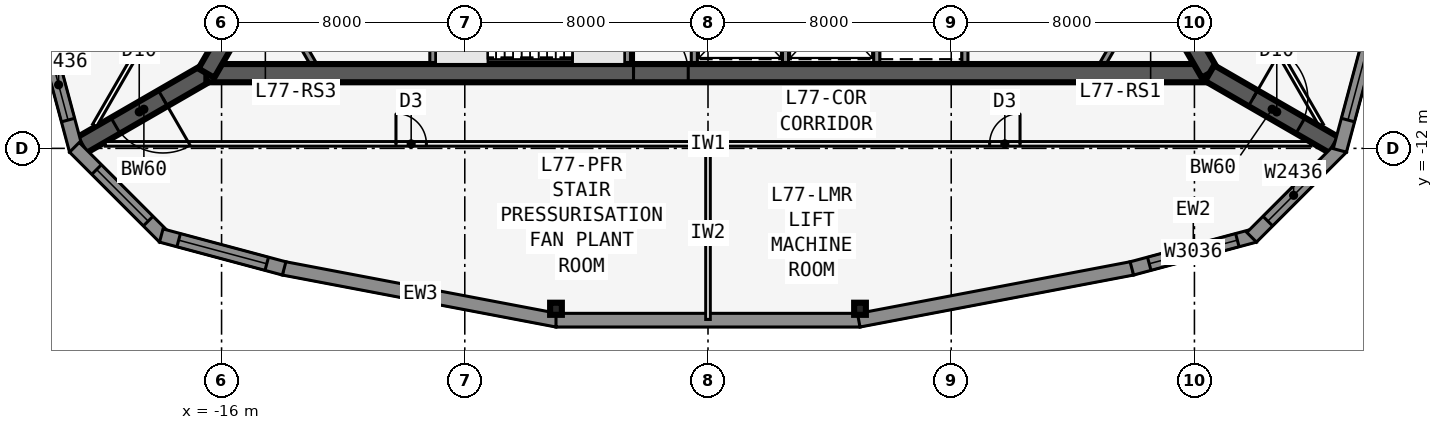
"""IFC4 building model, lengths in metres.
Left out: names, types, materials, properties, quantities, classifications, styles, units other than length and angle.
Written with IfcOpenShell. Run it as: python <this file> out.ifc"""

import sys

from ifc_helpers import new_model, si_unit, direction, frame, frame_2d, origin, origin_2d, place, context, subcontext, project, spatial, polyline, rectangle, i_section, outline, extrude, element, fill, save


model = new_model("IFC4")
c1 = context("Model", 3, precision=1e-05, world=origin(), true_north=direction((0.0, 1.0)))
c2 = subcontext(c1, "Body", "Model", "MODEL_VIEW")
j1 = project(units=[si_unit("LENGTHUNIT", "METRE"), si_unit("PLANEANGLEUNIT", "RADIAN")], contexts=[c1])
p1 = place(None, origin())
s1 = spatial("IfcSite", under=j1, at=p1, CompositionType="ELEMENT")
p2 = place(p1, origin())
s2 = spatial("IfcBuilding", under=s1, at=p2, CompositionType="ELEMENT")
p3 = place(p2, frame((0.0, 0.0, 297.8)))
s3 = spatial("IfcBuildingStorey", under=s2, at=p3, CompositionType="ELEMENT", Elevation=297.8)
p4 = place(p3, frame((-16.5, -9.526, 0.0), z_axis=(0.0, 0.0, 1.0), x_axis=(1.0, 0.0, 0.0)))
e1 = element("IfcWall", 1, at=p4, inside=s3, PredefinedType="SHEAR", context=c2, shape_type="SweptSolid", body=[
    extrude(rectangle(XDim=33.0, YDim=0.6, at=frame_2d((16.5, 0.0))), origin(), (0.0, 0.0, 1.0), 6.0),
])
p5 = place(p4, frame((14.05, 0.0, 0.0)))
e2 = element("IfcOpeningElement", 2, at=p5, cuts=e1, PredefinedType="OPENING", context=c2, shape_type="SweptSolid", body=[
    extrude(rectangle(XDim=1.8, YDim=2.13, at=frame_2d((0.9, 1.065))), frame((0.0, 0.31, 0.0), z_axis=(0.0, -1.0, 0.0), x_axis=(1.0, 0.0, 0.0)), (0.0, 0.0, 1.0), 0.62),
])
p6 = place(p3, frame((-9.05, -5.951, 0.0), z_axis=(0.0, 0.0, 1.0), x_axis=(0.0, -1.0, 0.0)))
e3 = element("IfcWall", 3, at=p6, inside=s3, PredefinedType="SOLIDWALL", context=c2, shape_type="SweptSolid", body=[
    extrude(rectangle(XDim=3.275, YDim=0.2, at=frame_2d((1.637, 0.0))), origin(), (0.0, 0.0, 1.0), 5.75),
])
p7 = place(p3, frame((-2.65, -5.951, 0.0), z_axis=(0.0, 0.0, 1.0), x_axis=(0.0, -1.0, 0.0)))
e4 = element("IfcWall", 4, at=p7, inside=s3, PredefinedType="SOLIDWALL", context=c2, shape_type="SweptSolid", body=[
    extrude(rectangle(XDim=3.275, YDim=0.2, at=frame_2d((1.637, 0.0))), origin(), (0.0, 0.0, 1.0), 5.75),
])
p8 = place(p7, frame((1.675, 0.0, 0.0)))
e5 = element("IfcOpeningElement", 5, at=p8, cuts=e4, PredefinedType="OPENING", context=c2, shape_type="SweptSolid", body=[
    extrude(rectangle(XDim=1.0, YDim=2.13, at=frame_2d((0.5, 1.065))), frame((0.0, 0.11, 0.0), z_axis=(0.0, -1.0, 0.0), x_axis=(1.0, 0.0, 0.0)), (0.0, 0.0, 1.0), 0.22),
])
for number, where, z_axis, x_axis in (
    (6, (-0.45, -5.951, 0.0), (0.0, 0.0, 1.0), (0.0, -1.0, 0.0)),
    (7, (2.55, -5.951, 0.0), (0.0, 0.0, 1.0), (0.0, -1.0, 0.0)),
    (8, (5.55, -5.951, 0.0), (0.0, 0.0, 1.0), (0.0, -1.0, 0.0)),
    (9, (8.45, -5.951, 0.0), (0.0, 0.0, 1.0), (0.0, -1.0, 0.0)),
):
    element("IfcWall", number, at=place(p3, frame(where, z_axis=z_axis, x_axis=x_axis)), inside=s3, PredefinedType="SOLIDWALL", context=c2, shape_type="SweptSolid", body=[
        extrude(rectangle(XDim=3.275, YDim=0.2, at=frame_2d((1.637, 0.0))), origin(), (0.0, 0.0, 1.0), 5.75),
    ])
p9 = place(p3, frame((16.5, -9.526, 0.0), z_axis=(0.0, 0.0, 1.0), x_axis=(-0.499999749417, 0.866025548458, 0.0)))
e10 = element("IfcWall", 10, at=p9, inside=s3, PredefinedType="SHEAR", context=c2, shape_type="SweptSolid", body=[
    extrude(rectangle(XDim=33.0, YDim=0.6, at=frame_2d((16.5, 0.0))), origin(), (0.0, 0.0, 1.0), 6.0),
])
p10 = place(p9, frame((14.15, 0.0, 0.0)))
e11 = element("IfcOpeningElement", 11, at=p10, cuts=e10, PredefinedType="OPENING", context=c2, shape_type="SweptSolid", body=[
    extrude(rectangle(XDim=1.8, YDim=2.13, at=frame_2d((0.9, 1.065))), frame((0.0, 0.31, 0.0), z_axis=(0.0, -1.0, 0.0), x_axis=(1.0, 0.0, 0.0)), (0.0, 0.0, 1.0), 0.62),
])
p11 = place(p9, frame((12.6, 0.0, 0.0)))
e12 = element("IfcOpeningElement", 12, at=p11, cuts=e10, PredefinedType="OPENING", context=c2, shape_type="SweptSolid", body=[
    extrude(rectangle(XDim=1.0, YDim=2.13, at=frame_2d((0.5, 1.065))), frame((0.0, 0.31, 0.0), z_axis=(0.0, -1.0, 0.0), x_axis=(1.0, 0.0, 0.0)), (0.0, 0.0, 1.0), 0.62),
])
p12 = place(p3, frame((0.0, 19.052, 0.0), z_axis=(0.0, 0.0, 1.0), x_axis=(-0.499999749417, -0.866025548458, 0.0)))
e13 = element("IfcWall", 13, at=p12, inside=s3, PredefinedType="SHEAR", context=c2, shape_type="SweptSolid", body=[
    extrude(rectangle(XDim=33.0, YDim=0.6, at=frame_2d((16.5, 0.0))), origin(), (0.0, 0.0, 1.0), 6.0),
])
p13 = place(p12, frame((14.15, 0.0, 0.0)))
e14 = element("IfcOpeningElement", 14, at=p13, cuts=e13, PredefinedType="OPENING", context=c2, shape_type="SweptSolid", body=[
    extrude(rectangle(XDim=1.8, YDim=2.13, at=frame_2d((0.9, 1.065))), frame((0.0, 0.31, 0.0), z_axis=(0.0, -1.0, 0.0), x_axis=(1.0, 0.0, 0.0)), (0.0, 0.0, 1.0), 0.62),
])
p14 = place(p12, frame((12.6, 0.0, 0.0)))
e15 = element("IfcOpeningElement", 15, at=p14, cuts=e13, PredefinedType="OPENING", context=c2, shape_type="SweptSolid", body=[
    extrude(rectangle(XDim=1.0, YDim=2.13, at=frame_2d((0.5, 1.065))), frame((0.0, 0.31, 0.0), z_axis=(0.0, -1.0, 0.0), x_axis=(1.0, 0.0, 0.0)), (0.0, 0.0, 1.0), 0.62),
])
p15 = place(p3, frame((16.5, -9.526, 0.0), z_axis=(0.0, 0.0, 1.0), x_axis=(0.866031398331, -0.499989616998, 0.0)))
e16 = element("IfcWall", 16, at=p15, inside=s3, PredefinedType="SHEAR", context=c2, shape_type="SweptSolid", body=[
    extrude(rectangle(XDim=4.746, YDim=0.6, at=frame_2d((2.373, 0.0))), origin(), (0.0, 0.0, 1.0), 6.0),
])
p16 = place(p15, frame((1.65, 0.0, 0.0)))
e17 = element("IfcOpeningElement", 17, at=p16, cuts=e16, PredefinedType="OPENING", context=c2, shape_type="SweptSolid", body=[
    extrude(rectangle(XDim=1.8, YDim=2.13, at=frame_2d((0.9, 1.065))), frame((0.0, 0.31, 0.0), z_axis=(0.0, -1.0, 0.0), x_axis=(1.0, 0.0, 0.0)), (0.0, 0.0, 1.0), 0.62),
])
p17 = place(p3, frame((-16.5, -9.526, 0.0), z_axis=(0.0, 0.0, 1.0), x_axis=(-0.866031398331, -0.499989616998, 0.0)))
e18 = element("IfcWall", 18, at=p17, inside=s3, PredefinedType="SHEAR", context=c2, shape_type="SweptSolid", body=[
    extrude(rectangle(XDim=4.746, YDim=0.6, at=frame_2d((2.373, 0.0))), origin(), (0.0, 0.0, 1.0), 6.0),
])
p18 = place(p17, frame((1.65, 0.0, 0.0)))
e19 = element("IfcOpeningElement", 19, at=p18, cuts=e18, PredefinedType="OPENING", context=c2, shape_type="SweptSolid", body=[
    extrude(rectangle(XDim=1.8, YDim=2.13, at=frame_2d((0.9, 1.065))), frame((0.0, 0.31, 0.0), z_axis=(0.0, -1.0, 0.0), x_axis=(1.0, 0.0, 0.0)), (0.0, 0.0, 1.0), 0.62),
])
for number, where, z_axis, x_axis in (
    (20, (-5.0, -17.276, 0.0), (0.0, 0.0, 1.0), (0.0, -1.0, 0.0)),
    (21, (5.0, -17.276, 0.0), (0.0, 0.0, 1.0), (0.0, -1.0, 0.0)),
):
    element("IfcColumn", number, at=place(p3, frame(where, z_axis=z_axis, x_axis=x_axis)), inside=s3, PredefinedType="COLUMN", context=c2, shape_type="SweptSolid", body=[
        extrude(i_section(OverallWidth=0.399, OverallDepth=0.386, WebThickness=0.021, FlangeThickness=0.033, at=origin_2d()), origin(), (0.0, 0.0, 1.0), 6.0),
    ])
p19 = place(p3, frame((-13.958, -15.945, 0.0), z_axis=(0.0, 0.0, 1.0), x_axis=(0.982425233625, -0.18665653039, 0.0)))
e22 = element("IfcWall", 22, at=p19, inside=s3, PredefinedType="SOLIDWALL", context=c2, shape_type="SweptSolid", body=[
    extrude(outline(polyline([(0.0, 0.0), (9.161, 0.0), (9.161, 5.75), (0.0, 5.75), (0.0, 0.0)]), holes=[polyline([(6.831, 2.875), (6.754, 3.457), (6.529, 4.0), (6.171, 4.466), (5.706, 4.823), (5.163, 5.048), (4.581, 5.125), (3.998, 5.048), (3.456, 4.823), (2.99, 4.466), (2.632, 4.0), (2.407, 3.457), (2.331, 2.875), (2.407, 2.293), (2.632, 1.75), (2.99, 1.284), (3.456, 0.926), (3.998, 0.702), (4.581, 0.625), (5.163, 0.702), (5.706, 0.926), (6.171, 1.284), (6.529, 1.75), (6.754, 2.293), (6.831, 2.875)])]), frame((0.0, 0.225, 0.0), z_axis=(0.0, -1.0, 0.0), x_axis=(1.0, 0.0, 0.0)), (0.0, 0.0, 1.0), 0.45),
])
p20 = place(p3, frame((-5.0, -17.651, 0.0), z_axis=(0.0, 0.0, 1.0), x_axis=(1.0, 0.0, 0.0)))
e23 = element("IfcWall", 23, at=p20, inside=s3, PredefinedType="SOLIDWALL", context=c2, shape_type="SweptSolid", body=[
    extrude(outline(polyline([(0.0, 0.0), (10.0, 0.0), (10.0, 5.75), (0.0, 5.75), (0.0, 0.0)]), holes=[polyline([(7.25, 2.875), (7.173, 3.457), (6.948, 4.0), (6.591, 4.466), (6.125, 4.823), (5.582, 5.048), (5.0, 5.125), (4.418, 5.048), (3.875, 4.823), (3.409, 4.466), (3.052, 4.0), (2.827, 3.457), (2.75, 2.875), (2.827, 2.293), (3.052, 1.75), (3.409, 1.284), (3.875, 0.926), (4.418, 0.702), (5.0, 0.625), (5.582, 0.702), (6.125, 0.926), (6.591, 1.284), (6.948, 1.75), (7.173, 2.293), (7.25, 2.875)])]), frame((0.0, 0.225, 0.0), z_axis=(0.0, -1.0, 0.0), x_axis=(1.0, 0.0, 0.0)), (0.0, 0.0, 1.0), 0.45),
])
p21 = place(p3, frame((4.958, -17.655, 0.0), z_axis=(0.0, 0.0, 1.0), x_axis=(0.982425233625, 0.18665653039, 0.0)))
e24 = element("IfcWall", 24, at=p21, inside=s3, PredefinedType="SOLIDWALL", context=c2, shape_type="SweptSolid", body=[
    extrude(outline(polyline([(0.0, 0.0), (9.161, 0.0), (9.161, 5.75), (0.0, 5.75), (0.0, 0.0)]), holes=[polyline([(6.831, 2.875), (6.754, 3.457), (6.529, 4.0), (6.171, 4.466), (5.706, 4.823), (5.163, 5.048), (4.581, 5.125), (3.998, 5.048), (3.456, 4.823), (2.99, 4.466), (2.632, 4.0), (2.407, 3.457), (2.331, 2.875), (2.407, 2.293), (2.632, 1.75), (2.99, 1.284), (3.456, 0.926), (3.998, 0.702), (4.581, 0.625), (5.163, 0.702), (5.706, 0.926), (6.171, 1.284), (6.529, 1.75), (6.754, 2.293), (6.831, 2.875)])]), frame((0.0, 0.225, 0.0), z_axis=(0.0, -1.0, 0.0), x_axis=(1.0, 0.0, 0.0)), (0.0, 0.0, 1.0), 0.45),
])
p22 = place(p3, frame((13.942, -15.948, 0.0), z_axis=(0.0, 0.0, 1.0), x_axis=(0.965920442324, 0.258839137498, 0.0)))
e25 = element("IfcWall", 25, at=p22, inside=s3, PredefinedType="SOLIDWALL", context=c2, shape_type="SweptSolid", body=[
    extrude(rectangle(XDim=4.184, YDim=0.45, at=frame_2d((2.092, 0.0))), origin(), (0.0, 0.0, 1.0), 5.75),
])
p23 = place(p22, frame((0.592, 0.0, 0.9)))
e26 = element("IfcOpeningElement", 26, at=p23, cuts=e25, PredefinedType="OPENING", context=c2, shape_type="SweptSolid", body=[
    extrude(rectangle(XDim=3.0, YDim=3.6, at=frame_2d((1.5, 1.8))), frame((0.0, 0.235, 0.0), z_axis=(0.0, -1.0, 0.0), x_axis=(1.0, 0.0, 0.0)), (0.0, 0.0, 1.0), 0.47),
])
p24 = place(p3, frame((17.882, -14.924, 0.0), z_axis=(0.0, 0.0, 1.0), x_axis=(0.707106781187, 0.707106781187, 0.0)))
e27 = element("IfcWall", 27, at=p24, inside=s3, PredefinedType="SOLIDWALL", context=c2, shape_type="SweptSolid", body=[
    extrude(outline(polyline([(4.184, 0.225), (4.125, 0.225), (3.778, 0.132), (3.753, 0.225), (0.0, 0.225), (0.0, -0.225), (4.184, -0.225), (4.184, 0.225)])), origin(), (0.0, 0.0, 1.0), 5.75),
])
p25 = place(p24, frame((0.751, 0.0, 0.9)))
e28 = element("IfcOpeningElement", 28, at=p25, cuts=e27, PredefinedType="OPENING", context=c2, shape_type="SweptSolid", body=[
    extrude(rectangle(XDim=2.4, YDim=3.6, at=frame_2d((1.2, 1.8))), frame((0.0, 0.235, 0.0), z_axis=(0.0, -1.0, 0.0), x_axis=(1.0, 0.0, 0.0)), (0.0, 0.0, 1.0), 0.47),
])
p26 = place(p3, frame((20.783, -12.066, 0.0), z_axis=(0.0, 0.0, 1.0), x_axis=(0.258784695888, 0.965935029479, 0.0)))
e29 = element("IfcWall", 29, at=p26, inside=s3, PredefinedType="SOLIDWALL", context=c2, shape_type="SweptSolid", body=[
    extrude(outline(polyline([(4.184, 0.225), (0.431, 0.225), (0.406, 0.132), (0.06, 0.225), (0.0, 0.225), (0.0, -0.225), (4.184, -0.225), (4.184, 0.225)])), origin(), (0.0, 0.0, 1.0), 5.75),
])
p27 = place(p26, frame((1.033, 0.0, 0.9)))
e30 = element("IfcOpeningElement", 30, at=p27, cuts=e29, PredefinedType="OPENING", context=c2, shape_type="SweptSolid", body=[
    extrude(rectangle(XDim=2.4, YDim=3.6, at=frame_2d((1.2, 1.8))), frame((0.0, 0.235, 0.0), z_axis=(0.0, -1.0, 0.0), x_axis=(1.0, 0.0, 0.0)), (0.0, 0.0, 1.0), 0.47),
])
p28 = place(p3, frame((-21.865, -8.025, 0.0), z_axis=(0.0, 0.0, 1.0), x_axis=(0.258784695888, -0.965935029479, 0.0)))
e31 = element("IfcWall", 31, at=p28, inside=s3, PredefinedType="SOLIDWALL", context=c2, shape_type="SweptSolid", body=[
    extrude(outline(polyline([(4.184, 0.225), (4.125, 0.225), (3.778, 0.132), (3.753, 0.225), (0.0, 0.225), (0.0, -0.225), (4.184, -0.225), (4.184, 0.225)])), origin(), (0.0, 0.0, 1.0), 5.75),
])
p29 = place(p28, frame((0.751, 0.0, 0.9)))
e32 = element("IfcOpeningElement", 32, at=p29, cuts=e31, PredefinedType="OPENING", context=c2, shape_type="SweptSolid", body=[
    extrude(rectangle(XDim=2.4, YDim=3.6, at=frame_2d((1.2, 1.8))), frame((0.0, 0.235, 0.0), z_axis=(0.0, -1.0, 0.0), x_axis=(1.0, 0.0, 0.0)), (0.0, 0.0, 1.0), 0.47),
])
p30 = place(p3, frame((-20.841, -11.965, 0.0), z_axis=(0.0, 0.0, 1.0), x_axis=(0.707106781187, -0.707106781187, 0.0)))
e33 = element("IfcWall", 33, at=p30, inside=s3, PredefinedType="SOLIDWALL", context=c2, shape_type="SweptSolid", body=[
    extrude(outline(polyline([(4.184, 0.225), (0.431, 0.225), (0.406, 0.132), (0.059, 0.225), (0.0, 0.225), (0.0, -0.225), (4.184, -0.225), (4.184, 0.225)])), origin(), (0.0, 0.0, 1.0), 5.75),
])
p31 = place(p30, frame((1.032, 0.0, 0.9)))
e34 = element("IfcOpeningElement", 34, at=p31, cuts=e33, PredefinedType="OPENING", context=c2, shape_type="SweptSolid", body=[
    extrude(rectangle(XDim=2.4, YDim=3.6, at=frame_2d((1.2, 1.8))), frame((0.0, 0.235, 0.0), z_axis=(0.0, -1.0, 0.0), x_axis=(1.0, 0.0, 0.0)), (0.0, 0.0, 1.0), 0.47),
])
p32 = place(p3, frame((-17.983, -14.865, 0.0), z_axis=(0.0, 0.0, 1.0), x_axis=(0.965920442324, -0.258839137498, 0.0)))
e35 = element("IfcWall", 35, at=p32, inside=s3, PredefinedType="SOLIDWALL", context=c2, shape_type="SweptSolid", body=[
    extrude(rectangle(XDim=4.184, YDim=0.45, at=frame_2d((2.092, 0.0))), origin(), (0.0, 0.0, 1.0), 5.75),
])
p33 = place(p32, frame((0.592, 0.0, 0.9)))
e36 = element("IfcOpeningElement", 36, at=p33, cuts=e35, PredefinedType="OPENING", context=c2, shape_type="SweptSolid", body=[
    extrude(rectangle(XDim=3.0, YDim=3.6, at=frame_2d((1.5, 1.8))), frame((0.0, 0.235, 0.0), z_axis=(0.0, -1.0, 0.0), x_axis=(1.0, 0.0, 0.0)), (0.0, 0.0, 1.0), 0.47),
])
p34 = place(p3, frame((-19.827, -11.851, 0.0), z_axis=(0.0, 0.0, 1.0), x_axis=(1.0, 0.0, 0.0)))
e37 = element("IfcWall", 37, at=p34, inside=s3, PredefinedType="PARTITIONING", context=c2, shape_type="SweptSolid", body=[
    extrude(rectangle(XDim=39.654, YDim=0.15, at=frame_2d((19.827, 0.0))), origin(), (0.0, 0.0, 1.0), 5.75),
])
p35 = place(p34, frame((9.563, 0.0, 0.0)))
e38 = element("IfcOpeningElement", 38, at=p35, cuts=e37, PredefinedType="OPENING", context=c2, shape_type="SweptSolid", body=[
    extrude(rectangle(XDim=1.0, YDim=2.13, at=frame_2d((0.5, 1.065))), frame((0.0, 0.085, 0.0), z_axis=(0.0, -1.0, 0.0), x_axis=(1.0, 0.0, 0.0)), (0.0, 0.0, 1.0), 0.17),
])
p36 = place(p34, frame((29.091, 0.0, 0.0)))
e39 = element("IfcOpeningElement", 39, at=p36, cuts=e37, PredefinedType="OPENING", context=c2, shape_type="SweptSolid", body=[
    extrude(rectangle(XDim=1.0, YDim=2.13, at=frame_2d((0.5, 1.065))), frame((0.0, 0.085, 0.0), z_axis=(0.0, -1.0, 0.0), x_axis=(1.0, 0.0, 0.0)), (0.0, 0.0, 1.0), 0.17),
])
p37 = place(p3, frame((0.0, -11.926, 0.0), z_axis=(0.0, 0.0, 1.0), x_axis=(0.0, -1.0, 0.0)))
e40 = element("IfcWall", 40, at=p37, inside=s3, PredefinedType="PARTITIONING", context=c2, shape_type="SweptSolid", body=[
    extrude(rectangle(XDim=5.699, YDim=0.15, at=frame_2d((2.85, 0.0))), origin(), (0.0, 0.0, 1.0), 4.708),
])
p38 = place(p3, frame((20.177, -11.245, 0.0), z_axis=(0.0, 0.0, 1.0), x_axis=(-0.499998875317, 0.866026053119, 0.0)))
e41 = element("IfcWall", 41, at=p38, inside=s3, PredefinedType="PARTITIONING", context=c2, shape_type="SweptSolid", body=[
    extrude(rectangle(XDim=39.654, YDim=0.15, at=frame_2d((19.827, 0.0))), origin(), (0.0, 0.0, 1.0), 5.75),
])
p39 = place(p38, frame((9.563, 0.0, 0.0)))
e42 = element("IfcOpeningElement", 42, at=p39, cuts=e41, PredefinedType="OPENING", context=c2, shape_type="SweptSolid", body=[
    extrude(rectangle(XDim=1.0, YDim=2.13, at=frame_2d((0.5, 1.065))), frame((0.0, 0.085, 0.0), z_axis=(0.0, -1.0, 0.0), x_axis=(1.0, 0.0, 0.0)), (0.0, 0.0, 1.0), 0.17),
])
p40 = place(p38, frame((29.091, 0.0, 0.0)))
e43 = element("IfcOpeningElement", 43, at=p40, cuts=e41, PredefinedType="OPENING", context=c2, shape_type="SweptSolid", body=[
    extrude(rectangle(XDim=1.0, YDim=2.13, at=frame_2d((0.5, 1.065))), frame((0.0, 0.085, 0.0), z_axis=(0.0, -1.0, 0.0), x_axis=(1.0, 0.0, 0.0)), (0.0, 0.0, 1.0), 0.17),
])
p41 = place(p3, frame((-0.35, 23.096, 0.0), z_axis=(0.0, 0.0, 1.0), x_axis=(-0.499998875317, -0.866026053119, 0.0)))
e44 = element("IfcWall", 44, at=p41, inside=s3, PredefinedType="PARTITIONING", context=c2, shape_type="SweptSolid", body=[
    extrude(rectangle(XDim=39.654, YDim=0.15, at=frame_2d((19.827, 0.0))), origin(), (0.0, 0.0, 1.0), 5.75),
])
p42 = place(p41, frame((9.563, 0.0, 0.0)))
e45 = element("IfcOpeningElement", 45, at=p42, cuts=e44, PredefinedType="OPENING", context=c2, shape_type="SweptSolid", body=[
    extrude(rectangle(XDim=1.0, YDim=2.13, at=frame_2d((0.5, 1.065))), frame((0.0, 0.085, 0.0), z_axis=(0.0, -1.0, 0.0), x_axis=(1.0, 0.0, 0.0)), (0.0, 0.0, 1.0), 0.17),
])
p43 = place(p41, frame((29.091, 0.0, 0.0)))
e46 = element("IfcOpeningElement", 46, at=p43, cuts=e44, PredefinedType="OPENING", context=c2, shape_type="SweptSolid", body=[
    extrude(rectangle(XDim=1.0, YDim=2.13, at=frame_2d((0.5, 1.065))), frame((0.0, 0.085, 0.0), z_axis=(0.0, -1.0, 0.0), x_axis=(1.0, 0.0, 0.0)), (0.0, 0.0, 1.0), 0.17),
])
for number, where, z_axis, x_axis in (
    (47, (14.479, -6.626, 0.0), (0.0, 0.0, 1.0), (-0.5, -0.866, 0.0)),
    (48, (-12.978, -9.226, 0.0), (0.0, 0.0, 1.0), (-0.5, 0.866, 0.0)),
):
    element("IfcWall", number, at=place(p3, frame(where, z_axis=z_axis, x_axis=x_axis)), inside=s3, PredefinedType="SOLIDWALL", context=c2, shape_type="SweptSolid", body=[
        extrude(rectangle(XDim=3.002, YDim=0.2, at=frame_2d((1.501, 0.0))), origin(), (0.0, 0.0, 1.0), 5.75),
    ])
p44 = place(p23, origin())
e49 = element("IfcWindow", 49, at=p44, inside=s3, PartitioningType="SINGLE_PANEL", PredefinedType="WINDOW", context=c2, shape_type="SweptSolid", body=[
    extrude(rectangle(XDim=3.0, YDim=3.6, at=frame_2d((1.5, 1.8))), frame((0.0, 0.03, 0.0), z_axis=(0.0, -1.0, 0.0), x_axis=(1.0, 0.0, 0.0)), (0.0, 0.0, 1.0), 0.06),
])
fill(e26, e49)
p45 = place(p25, origin())
e50 = element("IfcWindow", 50, at=p45, inside=s3, PartitioningType="SINGLE_PANEL", PredefinedType="WINDOW", context=c2, shape_type="SweptSolid", body=[
    extrude(rectangle(XDim=2.4, YDim=3.6, at=frame_2d((1.2, 1.8))), frame((0.0, 0.03, 0.0), z_axis=(0.0, -1.0, 0.0), x_axis=(1.0, 0.0, 0.0)), (0.0, 0.0, 1.0), 0.06),
])
fill(e28, e50)
p46 = place(p27, origin())
e51 = element("IfcWindow", 51, at=p46, inside=s3, PartitioningType="SINGLE_PANEL", PredefinedType="WINDOW", context=c2, shape_type="SweptSolid", body=[
    extrude(rectangle(XDim=2.4, YDim=3.6, at=frame_2d((1.2, 1.8))), frame((0.0, 0.03, 0.0), z_axis=(0.0, -1.0, 0.0), x_axis=(1.0, 0.0, 0.0)), (0.0, 0.0, 1.0), 0.06),
])
fill(e30, e51)
p47 = place(p29, origin())
e52 = element("IfcWindow", 52, at=p47, inside=s3, PartitioningType="SINGLE_PANEL", PredefinedType="WINDOW", context=c2, shape_type="SweptSolid", body=[
    extrude(rectangle(XDim=2.4, YDim=3.6, at=frame_2d((1.2, 1.8))), frame((0.0, 0.03, 0.0), z_axis=(0.0, -1.0, 0.0), x_axis=(1.0, 0.0, 0.0)), (0.0, 0.0, 1.0), 0.06),
])
fill(e32, e52)
p48 = place(p31, origin())
e53 = element("IfcWindow", 53, at=p48, inside=s3, PartitioningType="SINGLE_PANEL", PredefinedType="WINDOW", context=c2, shape_type="SweptSolid", body=[
    extrude(rectangle(XDim=2.4, YDim=3.6, at=frame_2d((1.2, 1.8))), frame((0.0, 0.03, 0.0), z_axis=(0.0, -1.0, 0.0), x_axis=(1.0, 0.0, 0.0)), (0.0, 0.0, 1.0), 0.06),
])
fill(e34, e53)
p49 = place(p33, origin())
e54 = element("IfcWindow", 54, at=p49, inside=s3, PartitioningType="SINGLE_PANEL", PredefinedType="WINDOW", context=c2, shape_type="SweptSolid", body=[
    extrude(rectangle(XDim=3.0, YDim=3.6, at=frame_2d((1.5, 1.8))), frame((0.0, 0.03, 0.0), z_axis=(0.0, -1.0, 0.0), x_axis=(1.0, 0.0, 0.0)), (0.0, 0.0, 1.0), 0.06),
])
fill(e36, e54)
p50 = place(p35, origin())
e55 = element("IfcDoor", 55, at=p50, inside=s3, OperationType="SINGLE_SWING_LEFT", PredefinedType="DOOR", context=c2, shape_type="SweptSolid", body=[
    extrude(rectangle(XDim=1.0, YDim=2.13, at=frame_2d((0.5, 1.065))), frame((0.0, 0.025, 0.0), z_axis=(0.0, -1.0, 0.0), x_axis=(1.0, 0.0, 0.0)), (0.0, 0.0, 1.0), 0.05),
])
fill(e38, e55)
p51 = place(p36, origin())
e56 = element("IfcDoor", 56, at=p51, inside=s3, OperationType="SINGLE_SWING_RIGHT", PredefinedType="DOOR", context=c2, shape_type="SweptSolid", body=[
    extrude(rectangle(XDim=1.0, YDim=2.13, at=frame_2d((0.5, 1.065))), frame((0.0, 0.025, 0.0), z_axis=(0.0, -1.0, 0.0), x_axis=(1.0, 0.0, 0.0)), (0.0, 0.0, 1.0), 0.05),
])
fill(e39, e56)
p52 = place(p5, origin())
e57 = element("IfcDoor", 57, at=p52, inside=s3, OperationType="DOUBLE_DOOR_SINGLE_SWING", PredefinedType="DOOR", context=c2, shape_type="SweptSolid", body=[
    extrude(rectangle(XDim=1.8, YDim=2.13, at=frame_2d((0.9, 1.065))), frame((0.0, 0.025, 0.0), z_axis=(0.0, -1.0, 0.0), x_axis=(1.0, 0.0, 0.0)), (0.0, 0.0, 1.0), 0.05),
])
fill(e2, e57)
p53 = place(p16, origin())
e58 = element("IfcDoor", 58, at=p53, inside=s3, OperationType="DOUBLE_DOOR_DOUBLE_SWING", PredefinedType="DOOR", context=c2, shape_type="SweptSolid", body=[
    extrude(rectangle(XDim=1.8, YDim=2.13, at=frame_2d((0.9, 1.065))), frame((0.0, 0.025, 0.0), z_axis=(0.0, -1.0, 0.0), x_axis=(1.0, 0.0, 0.0)), (0.0, 0.0, 1.0), 0.05),
])
fill(e17, e58)
p54 = place(p18, origin())
e59 = element("IfcDoor", 59, at=p54, inside=s3, OperationType="DOUBLE_DOOR_DOUBLE_SWING", PredefinedType="DOOR", context=c2, shape_type="SweptSolid", body=[
    extrude(rectangle(XDim=1.8, YDim=2.13, at=frame_2d((0.9, 1.065))), frame((0.0, 0.025, 0.0), z_axis=(0.0, -1.0, 0.0), x_axis=(1.0, 0.0, 0.0)), (0.0, 0.0, 1.0), 0.05),
])
fill(e19, e59)
save(model, sys.argv[1])
